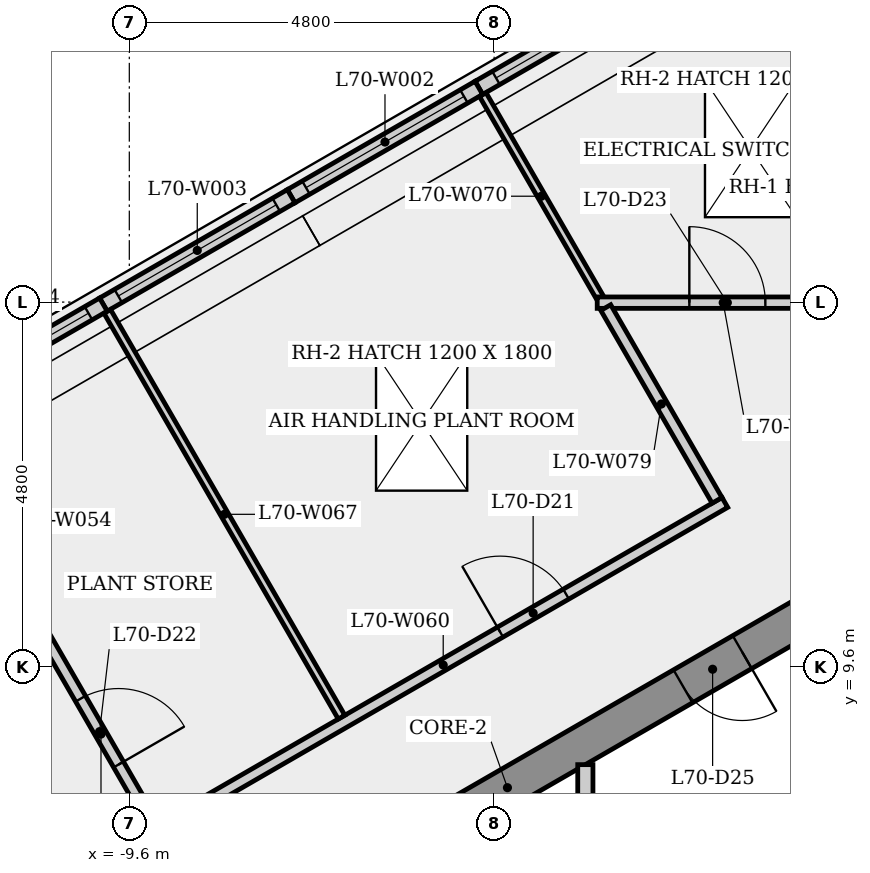
"""IFC4 building model, lengths in metres.
Left out: names, types, materials, properties, quantities, classifications, styles, units other than length and angle.
Written with IfcOpenShell. Run it as: python <this file> out.ifc"""

import sys

from ifc_helpers import new_model, si_unit, direction, frame, frame_2d, origin, origin_2d, place, context, subcontext, project, spatial, rectangle, extrude, element, fill, save


model = new_model("IFC4")
c1 = context("Model", 3, precision=1e-05, world=origin(), true_north=direction((0.0, 1.0)))
c2 = subcontext(c1, "Body", "Model", "MODEL_VIEW")
j1 = project(units=[si_unit("LENGTHUNIT", "METRE"), si_unit("PLANEANGLEUNIT", "RADIAN")], contexts=[c1])
p1 = place(None, origin())
s1 = spatial("IfcSite", under=j1, at=p1, CompositionType="ELEMENT")
p2 = place(p1, origin())
s2 = spatial("IfcBuilding", under=s1, at=p2, CompositionType="ELEMENT")
p3 = place(p2, frame((0.0, 0.0, 262.9)))
s3 = spatial("IfcBuildingStorey", under=s2, at=p3, CompositionType="ELEMENT", Elevation=262.9)
p4 = place(p3, frame((0.125, 10.753, 0.0), z_axis=(0.0, 0.0, 1.0), x_axis=(-0.866023993627, -0.500002442456, 0.0)))
e1 = element("IfcWall", 1, at=p4, inside=s3, PredefinedType="SHEAR", context=c2, shape_type="SweptSolid", body=[
    extrude(rectangle(XDim=10.97, YDim=0.5, at=frame_2d((5.485, 0.0))), origin(), (0.0, 0.0, 1.0), 4.8),
])
p5 = place(p4, frame((7.113, 0.0, 0.0)))
e2 = element("IfcOpeningElement", 2, at=p5, cuts=e1, PredefinedType="OPENING", context=c2, shape_type="SweptSolid", body=[
    extrude(rectangle(XDim=0.9, YDim=2.1, at=frame_2d((0.45, 1.05))), frame((0.0, 0.26, 0.0), z_axis=(0.0, -1.0, 0.0), x_axis=(1.0, 0.0, 0.0)), (0.0, 0.0, 1.0), 0.52),
])
p6 = place(p4, frame((1.918, 0.0, 0.0)))
e3 = element("IfcOpeningElement", 3, at=p6, cuts=e1, PredefinedType="OPENING", context=c2, shape_type="SweptSolid", body=[
    extrude(rectangle(XDim=0.9, YDim=2.1, at=frame_2d((0.45, 1.05))), frame((0.0, 0.26, 0.0), z_axis=(0.0, -1.0, 0.0), x_axis=(1.0, 0.0, 0.0)), (0.0, 0.0, 1.0), 0.52),
])
p7 = place(p3, frame((-2.471, 18.68, 0.0), z_axis=(0.0, 0.0, 1.0), x_axis=(-0.866033925456, -0.499985239742, 0.0)))
e4 = element("IfcWall", 4, at=p7, inside=s3, PredefinedType="SOLIDWALL", context=c2, shape_type="SweptSolid", body=[
    extrude(rectangle(XDim=2.922, YDim=0.2, at=frame_2d((1.461, 0.0))), origin(), (0.0, 0.0, 1.0), 4.8),
])
p8 = place(p7, frame((0.261, 0.0, 0.8)))
e5 = element("IfcOpeningElement", 5, at=p8, cuts=e4, PredefinedType="OPENING", context=c2, shape_type="SweptSolid", body=[
    extrude(rectangle(XDim=2.4, YDim=2.4, at=frame_2d((1.2, 1.2))), frame((0.0, 0.11, 0.0), z_axis=(0.0, -1.0, 0.0), x_axis=(1.0, 0.0, 0.0)), (0.0, 0.0, 1.0), 0.22),
])
p9 = place(p3, frame((-5.001, 17.219, 0.0), z_axis=(0.0, 0.0, 1.0), x_axis=(-0.866027356191, -0.499996618317, 0.0)))
e6 = element("IfcWall", 6, at=p9, inside=s3, PredefinedType="SOLIDWALL", context=c2, shape_type="SweptSolid", body=[
    extrude(rectangle(XDim=2.852, YDim=0.2, at=frame_2d((1.426, 0.0))), origin(), (0.0, 0.0, 1.0), 4.8),
])
p10 = place(p9, frame((0.226, 0.0, 0.8)))
e7 = element("IfcOpeningElement", 7, at=p10, cuts=e6, PredefinedType="OPENING", context=c2, shape_type="SweptSolid", body=[
    extrude(rectangle(XDim=2.4, YDim=2.4, at=frame_2d((1.2, 1.2))), frame((0.0, 0.11, 0.0), z_axis=(0.0, -1.0, 0.0), x_axis=(1.0, 0.0, 0.0)), (0.0, 0.0, 1.0), 0.22),
])
p11 = place(p3, frame((-7.471, 15.793, 0.0), z_axis=(0.0, 0.0, 1.0), x_axis=(-0.8660059538, -0.500033686847, 0.0)))
e8 = element("IfcWall", 8, at=p11, inside=s3, PredefinedType="SOLIDWALL", context=c2, shape_type="SweptSolid", body=[
    extrude(rectangle(XDim=2.852, YDim=0.2, at=frame_2d((1.426, 0.0))), origin(), (0.0, 0.0, 1.0), 4.8),
])
p12 = place(p11, frame((0.226, 0.0, 0.8)))
e9 = element("IfcOpeningElement", 9, at=p12, cuts=e8, PredefinedType="OPENING", context=c2, shape_type="SweptSolid", body=[
    extrude(rectangle(XDim=2.4, YDim=2.4, at=frame_2d((1.2, 1.2))), frame((0.0, 0.11, 0.0), z_axis=(0.0, -1.0, 0.0), x_axis=(1.0, 0.0, 0.0)), (0.0, 0.0, 1.0), 0.22),
])
p13 = place(p3, frame((-9.941, 14.367, 0.0), z_axis=(0.0, 0.0, 1.0), x_axis=(-0.866038819146, -0.499976763192, 0.0)))
e10 = element("IfcWall", 10, at=p13, inside=s3, PredefinedType="SOLIDWALL", context=c2, shape_type="SweptSolid", body=[
    extrude(rectangle(XDim=2.853, YDim=0.2, at=frame_2d((1.427, 0.0))), origin(), (0.0, 0.0, 1.0), 4.8),
])
p14 = place(p13, frame((0.227, 0.0, 0.8)))
e11 = element("IfcOpeningElement", 11, at=p14, cuts=e10, PredefinedType="OPENING", context=c2, shape_type="SweptSolid", body=[
    extrude(rectangle(XDim=2.4, YDim=2.4, at=frame_2d((1.2, 1.2))), frame((0.0, 0.11, 0.0), z_axis=(0.0, -1.0, 0.0), x_axis=(1.0, 0.0, 0.0)), (0.0, 0.0, 1.0), 0.22),
])
p15 = place(p3, frame((-10.742, 10.049, 0.0), z_axis=(0.0, 0.0, 1.0), x_axis=(0.49998558977, -0.866033723375, 0.0)))
e12 = element("IfcWall", 12, at=p15, inside=s3, PredefinedType="PARTITIONING", context=c2, shape_type="SweptSolid", body=[
    extrude(rectangle(XDim=3.079, YDim=0.15, at=frame_2d((1.539, 0.0))), origin(), (0.0, 0.0, 1.0), 4.5),
])
p16 = place(p15, frame((1.002, 0.0, 0.0)))
e13 = element("IfcOpeningElement", 13, at=p16, cuts=e12, PredefinedType="OPENING", context=c2, shape_type="SweptSolid", body=[
    extrude(rectangle(XDim=1.0, YDim=2.1, at=frame_2d((0.5, 1.05))), frame((0.0, 0.085, 0.0), z_axis=(0.0, -1.0, 0.0), x_axis=(1.0, 0.0, 0.0)), (0.0, 0.0, 1.0), 0.17),
])
p17 = place(p3, frame((-9.176, 7.485, 0.0), z_axis=(0.0, 0.0, 1.0), x_axis=(0.8660311782, 0.499989998285, 0.0)))
e14 = element("IfcWall", 14, at=p17, inside=s3, PredefinedType="PARTITIONING", context=c2, shape_type="SweptSolid", body=[
    extrude(rectangle(XDim=8.557, YDim=0.15, at=frame_2d((4.279, 0.0))), origin(), (0.0, 0.0, 1.0), 4.5),
])
p18 = place(p17, frame((5.145, 0.0, 0.0)))
e15 = element("IfcOpeningElement", 15, at=p18, cuts=e14, PredefinedType="OPENING", context=c2, shape_type="SweptSolid", body=[
    extrude(rectangle(XDim=1.0, YDim=2.1, at=frame_2d((0.5, 1.05))), frame((0.0, 0.085, 0.0), z_axis=(0.0, -1.0, 0.0), x_axis=(1.0, 0.0, 0.0)), (0.0, 0.0, 1.0), 0.17),
])
p19 = place(p3, frame((-6.808, 8.939, 0.0), z_axis=(0.0, 0.0, 1.0), x_axis=(-0.49999446594, 0.866028598852, 0.0)))
e16 = element("IfcWall", 16, at=p19, inside=s3, PredefinedType="PARTITIONING", context=c2, shape_type="SweptSolid", body=[
    extrude(rectangle(XDim=6.164, YDim=0.1, at=frame_2d((3.082, 0.0))), origin(), (0.0, 0.0, 1.0), 4.5),
])
p20 = place(p3, frame((-4.949, 17.129, 0.0), z_axis=(0.0, 0.0, 1.0), x_axis=(0.499943966227, -0.866057752481, 0.0)))
e17 = element("IfcWall", 17, at=p20, inside=s3, PredefinedType="PARTITIONING", context=c2, shape_type="SweptSolid", body=[
    extrude(rectangle(XDim=3.085, YDim=0.1, at=frame_2d((1.542, 0.0))), origin(), (0.0, 0.0, 1.0), 4.5),
])
p21 = place(p3, frame((-3.6, 8.314, 0.0), z_axis=(0.0, 0.0, 1.0), x_axis=(0.0, -1.0, 0.0)))
e18 = element("IfcWall", 18, at=p21, inside=s3, PredefinedType="PARTITIONING", context=c2, shape_type="SweptSolid", body=[
    extrude(rectangle(XDim=3.064, YDim=0.2, at=frame_2d((1.532, 0.0))), origin(), (0.0, 0.0, 1.0), 4.5),
])
p22 = place(p3, frame((-3.444, 14.393, 0.0), z_axis=(0.0, 0.0, 1.0), x_axis=(1.0, 0.0, 0.0)))
e19 = element("IfcWall", 19, at=p22, inside=s3, PredefinedType="PARTITIONING", context=c2, shape_type="SweptSolid", body=[
    extrude(rectangle(XDim=3.314, YDim=0.15, at=frame_2d((1.657, 0.0))), origin(), (0.0, 0.0, 1.0), 4.5),
])
p23 = place(p22, frame((1.212, 0.0, 0.0)))
e20 = element("IfcOpeningElement", 20, at=p23, cuts=e19, PredefinedType="OPENING", context=c2, shape_type="SweptSolid", body=[
    extrude(rectangle(XDim=1.0, YDim=2.1, at=frame_2d((0.5, 1.05))), frame((0.0, 0.085, 0.0), z_axis=(0.0, -1.0, 0.0), x_axis=(1.0, 0.0, 0.0)), (0.0, 0.0, 1.0), 0.17),
])
p24 = place(p3, frame((-1.867, 11.791, 0.0), z_axis=(0.0, 0.0, 1.0), x_axis=(-0.499967823365, 0.866043980176, 0.0)))
e21 = element("IfcWall", 21, at=p24, inside=s3, PredefinedType="PARTITIONING", context=c2, shape_type="SweptSolid", body=[
    extrude(rectangle(XDim=2.928, YDim=0.15, at=frame_2d((1.464, 0.0))), origin(), (0.0, 0.0, 1.0), 4.5),
])
p25 = place(p8, origin())
e22 = element("IfcWindow", 22, at=p25, inside=s3, PartitioningType="SINGLE_PANEL", PredefinedType="WINDOW", context=c2, shape_type="SweptSolid", body=[
    extrude(rectangle(XDim=2.4, YDim=2.4, at=frame_2d((1.2, 1.2))), frame((0.0, 0.03, 0.0), z_axis=(0.0, -1.0, 0.0), x_axis=(1.0, 0.0, 0.0)), (0.0, 0.0, 1.0), 0.06),
])
fill(e5, e22)
p26 = place(p10, origin())
e23 = element("IfcWindow", 23, at=p26, inside=s3, PartitioningType="SINGLE_PANEL", PredefinedType="WINDOW", context=c2, shape_type="SweptSolid", body=[
    extrude(rectangle(XDim=2.4, YDim=2.4, at=frame_2d((1.2, 1.2))), frame((0.0, 0.03, 0.0), z_axis=(0.0, -1.0, 0.0), x_axis=(1.0, 0.0, 0.0)), (0.0, 0.0, 1.0), 0.06),
])
fill(e7, e23)
p27 = place(p12, origin())
e24 = element("IfcWindow", 24, at=p27, inside=s3, PartitioningType="SINGLE_PANEL", PredefinedType="WINDOW", context=c2, shape_type="SweptSolid", body=[
    extrude(rectangle(XDim=2.4, YDim=2.4, at=frame_2d((1.2, 1.2))), frame((0.0, 0.03, 0.0), z_axis=(0.0, -1.0, 0.0), x_axis=(1.0, 0.0, 0.0)), (0.0, 0.0, 1.0), 0.06),
])
fill(e9, e24)
p28 = place(p14, origin())
e25 = element("IfcWindow", 25, at=p28, inside=s3, PartitioningType="SINGLE_PANEL", PredefinedType="WINDOW", context=c2, shape_type="SweptSolid", body=[
    extrude(rectangle(XDim=2.4, YDim=2.4, at=frame_2d((1.2, 1.2))), frame((0.0, 0.03, 0.0), z_axis=(0.0, -1.0, 0.0), x_axis=(1.0, 0.0, 0.0)), (0.0, 0.0, 1.0), 0.06),
])
fill(e11, e25)
p29 = place(p2, frame((0.0, 0.0, 267.7)))
p30 = place(p29, origin())
p31 = place(p30, frame((-5.754, 12.819, -0.01)))
p32 = place(p31, frame((0.0, 0.0, 0.26)))
e26 = element("IfcWindow", 26, at=p32, inside=s3, PartitioningType="SINGLE_PANEL", PredefinedType="SKYLIGHT", context=c2, shape_type="SweptSolid", body=[
    extrude(rectangle(XDim=1.8, YDim=1.2, at=origin_2d()), origin(), (0.0, 0.0, 1.0), 0.05),
])
p33 = place(p30, frame((-1.426, 16.417, -0.01)))
p34 = place(p33, frame((0.0, 0.0, 0.26)))
e27 = element("IfcWindow", 27, at=p34, inside=s3, PartitioningType="SINGLE_PANEL", PredefinedType="SKYLIGHT", context=c2, shape_type="SweptSolid", body=[
    extrude(rectangle(XDim=1.8, YDim=1.2, at=origin_2d()), origin(), (0.0, 0.0, 1.0), 0.05),
])
p35 = place(p18, origin())
e28 = element("IfcDoor", 28, at=p35, inside=s3, OperationType="SINGLE_SWING_LEFT", PredefinedType="DOOR", context=c2, shape_type="SweptSolid", body=[
    extrude(rectangle(XDim=1.0, YDim=2.1, at=frame_2d((0.5, 1.05))), frame((0.0, 0.025, 0.0), z_axis=(0.0, -1.0, 0.0), x_axis=(1.0, 0.0, 0.0)), (0.0, 0.0, 1.0), 0.05),
])
fill(e15, e28)
p36 = place(p16, origin())
e29 = element("IfcDoor", 29, at=p36, inside=s3, OperationType="SINGLE_SWING_RIGHT", PredefinedType="DOOR", context=c2, shape_type="SweptSolid", body=[
    extrude(rectangle(XDim=1.0, YDim=2.1, at=frame_2d((0.5, 1.05))), frame((0.0, 0.025, 0.0), z_axis=(0.0, -1.0, 0.0), x_axis=(1.0, 0.0, 0.0)), (0.0, 0.0, 1.0), 0.05),
])
fill(e13, e29)
p37 = place(p23, origin())
e30 = element("IfcDoor", 30, at=p37, inside=s3, OperationType="SINGLE_SWING_LEFT", PredefinedType="DOOR", context=c2, shape_type="SweptSolid", body=[
    extrude(rectangle(XDim=1.0, YDim=2.1, at=frame_2d((0.5, 1.05))), frame((0.0, 0.025, 0.0), z_axis=(0.0, -1.0, 0.0), x_axis=(1.0, 0.0, 0.0)), (0.0, 0.0, 1.0), 0.05),
])
fill(e20, e30)
p38 = place(p6, origin())
e31 = element("IfcDoor", 31, at=p38, inside=s3, OperationType="SINGLE_SWING_LEFT", PredefinedType="DOOR", context=c2, shape_type="SweptSolid", body=[
    extrude(rectangle(XDim=0.9, YDim=2.1, at=frame_2d((0.45, 1.05))), frame((0.0, 0.025, 0.0), z_axis=(0.0, -1.0, 0.0), x_axis=(1.0, 0.0, 0.0)), (0.0, 0.0, 1.0), 0.05),
])
fill(e3, e31)
save(model, sys.argv[1])
